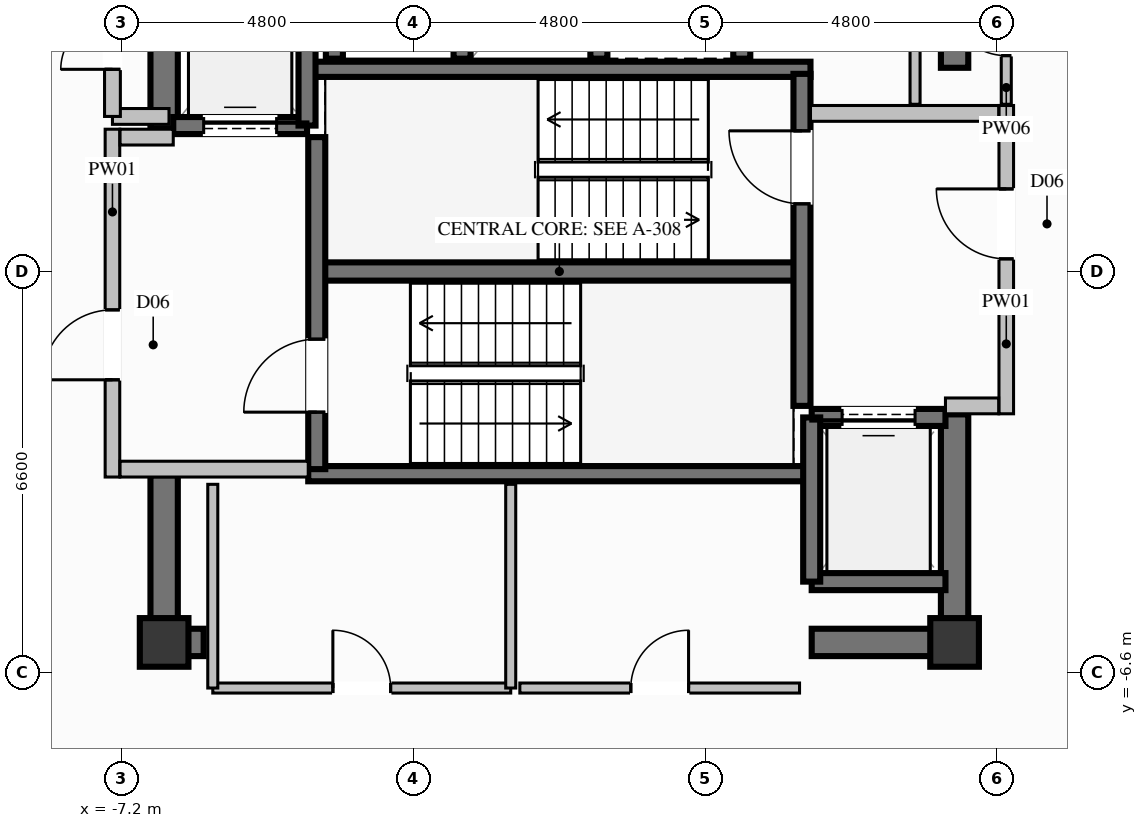
"""IFC4 building model, lengths in metres.
Left out: names, types, materials, properties, quantities, classifications, styles, units other than length and angle.
Written with IfcOpenShell. Run it as: python <this file> out.ifc"""

import sys

from ifc_helpers import new_model, si_unit, direction, frame, frame_2d, origin, origin_2d, place, context, subcontext, project, spatial, rectangle, extrude, element, fill, save


model = new_model("IFC4")
c1 = context("Model", 3, precision=1e-05, world=origin(), true_north=direction((0.0, 1.0)))
c2 = subcontext(c1, "Body", "Model", "MODEL_VIEW")
j1 = project(units=[si_unit("LENGTHUNIT", "METRE"), si_unit("PLANEANGLEUNIT", "RADIAN")], contexts=[c1])
p1 = place(None, origin())
s1 = spatial("IfcSite", under=j1, at=p1, CompositionType="ELEMENT")
p2 = place(p1, origin())
s2 = spatial("IfcBuilding", under=s1, at=p2, CompositionType="ELEMENT")
p3 = place(p2, frame((0.0, 0.0, 289.6)))
s3 = spatial("IfcBuildingStorey", under=s2, at=p3, CompositionType="ELEMENT", Elevation=289.6)
for number, where, z_axis, x_axis in (
    (1, (-6.5, -6.1, 0.0), (0.0, 0.0, 1.0), (1.0, 0.0, 0.0)),
    (2, (6.5, -6.1, 0.0), (0.0, 0.0, 1.0), (1.0, 0.0, 0.0)),
):
    element("IfcColumn", number, at=place(p3, frame(where, z_axis=z_axis, x_axis=x_axis)), inside=s3, PredefinedType="COLUMN", context=c2, shape_type="SweptSolid", body=[
        extrude(rectangle(XDim=0.8, YDim=0.8, at=origin_2d()), origin(), (0.0, 0.0, 1.0), 3.8),
    ])
p4 = place(p3, frame((-3.99, 0.0, 0.0), z_axis=(0.0, 0.0, 1.0), x_axis=(1.0, 0.0, 0.0)))
e3 = element("IfcWall", 3, at=p4, inside=s3, PredefinedType="SHEAR", context=c2, shape_type="SweptSolid", body=[
    extrude(rectangle(XDim=7.98, YDim=0.3, at=frame_2d((3.99, 0.0))), origin(), (0.0, 0.0, 1.0), 3.8),
])
for number, where, z_axis, x_axis in (
    (4, (-4.13, -3.325, 0.0), (0.0, 0.0, 1.0), (1.0, 0.0, 0.0)),
    (5, (-4.13, 3.325, 0.0), (0.0, 0.0, 1.0), (1.0, 0.0, 0.0)),
):
    element("IfcWall", number, at=place(p3, frame(where, z_axis=z_axis, x_axis=x_axis)), inside=s3, PredefinedType="SOLIDWALL", context=c2, shape_type="SweptSolid", body=[
        extrude(rectangle(XDim=8.26, YDim=0.25, at=frame_2d((4.13, 0.0))), origin(), (0.0, 0.0, 1.0), 3.8),
    ])
p5 = place(p3, frame((-6.275, -6.1, 0.0), z_axis=(0.0, 0.0, 1.0), x_axis=(1.0, 0.0, 0.0)))
e6 = element("IfcWall", 6, at=p5, inside=s3, PredefinedType="SHEAR", context=c2, shape_type="SweptSolid", body=[
    extrude(rectangle(XDim=0.425, YDim=0.45, at=frame_2d((0.212, 0.0))), origin(), (0.0, 0.0, 1.0), 3.8),
])
p6 = place(p3, frame((4.15, -6.1, 0.0), z_axis=(0.0, 0.0, 1.0), x_axis=(1.0, 0.0, 0.0)))
e7 = element("IfcWall", 7, at=p6, inside=s3, PredefinedType="SHEAR", context=c2, shape_type="SweptSolid", body=[
    extrude(rectangle(XDim=2.125, YDim=0.45, at=frame_2d((1.062, 0.0))), origin(), (0.0, 0.0, 1.0), 3.8),
])
p7 = place(p3, frame((-6.5, 2.35, 0.0), z_axis=(0.0, 0.0, 1.0), x_axis=(0.0, 1.0, 0.0)))
e8 = element("IfcWall", 8, at=p7, inside=s3, PredefinedType="SHEAR", context=c2, shape_type="SweptSolid", body=[
    extrude(rectangle(XDim=3.975, YDim=0.45, at=frame_2d((1.987, 0.0))), origin(), (0.0, 0.0, 1.0), 3.8),
])
p8 = place(p3, frame((-6.5, -6.325, 0.0), z_axis=(0.0, 0.0, 1.0), x_axis=(0.0, 1.0, 0.0)))
e9 = element("IfcWall", 9, at=p8, inside=s3, PredefinedType="SHEAR", context=c2, shape_type="SweptSolid", body=[
    extrude(rectangle(XDim=2.975, YDim=0.45, at=frame_2d((1.487, 0.0))), origin(), (0.0, 0.0, 1.0), 3.8),
])
p9 = place(p3, frame((6.5, -6.325, 0.0), z_axis=(0.0, 0.0, 1.0), x_axis=(0.0, 1.0, 0.0)))
e10 = element("IfcWall", 10, at=p9, inside=s3, PredefinedType="SHEAR", context=c2, shape_type="SweptSolid", body=[
    extrude(rectangle(XDim=3.975, YDim=0.45, at=frame_2d((1.987, 0.0))), origin(), (0.0, 0.0, 1.0), 3.8),
])
p10 = place(p3, frame((6.5, 3.35, 0.0), z_axis=(0.0, 0.0, 1.0), x_axis=(0.0, 1.0, 0.0)))
e11 = element("IfcWall", 11, at=p10, inside=s3, PredefinedType="SHEAR", context=c2, shape_type="SweptSolid", body=[
    extrude(rectangle(XDim=2.975, YDim=0.45, at=frame_2d((1.487, 0.0))), origin(), (0.0, 0.0, 1.0), 3.8),
])
for number, where, z_axis, x_axis in (
    (12, (-3.7, 6.0, 0.0), (0.0, 0.0, 1.0), (0.0, -1.0, 0.0)),
    (13, (-1.6, 3.5, 0.0), (0.0, 0.0, 1.0), (0.0, 1.0, 0.0)),
    (14, (0.65, 3.5, 0.0), (0.0, 0.0, 1.0), (0.0, 1.0, 0.0)),
    (15, (3.0, 3.5, 0.0), (0.0, 0.0, 1.0), (0.0, 1.0, 0.0)),
):
    element("IfcWall", number, at=place(p3, frame(where, z_axis=z_axis, x_axis=x_axis)), inside=s3, PredefinedType="SOLIDWALL", context=c2, shape_type="SweptSolid", body=[
        extrude(rectangle(XDim=2.5, YDim=0.28, at=frame_2d((1.25, 0.0))), origin(), (0.0, 0.0, 1.0), 3.57),
    ])
p11 = place(p3, frame((-6.35, 2.4, 0.0), z_axis=(0.0, 0.0, 1.0), x_axis=(1.0, 0.0, 0.0)))
e16 = element("IfcWall", 16, at=p11, inside=s3, PredefinedType="SOLIDWALL", context=c2, shape_type="SweptSolid", body=[
    extrude(rectangle(XDim=2.2, YDim=0.28, at=frame_2d((1.1, 0.0))), origin(), (0.0, 0.0, 1.0), 3.57),
])
p12 = place(p11, frame((0.5, 0.0, 0.0)))
e17 = element("IfcOpeningElement", 17, at=p12, cuts=e16, PredefinedType="OPENING", context=c2, shape_type="SweptSolid", body=[
    extrude(rectangle(XDim=1.2, YDim=2.2, at=frame_2d((0.6, 1.1))), frame((0.0, 0.15, 0.0), z_axis=(0.0, -1.0, 0.0), x_axis=(1.0, 0.0, 0.0)), (0.0, 0.0, 1.0), 0.3),
])
p13 = place(p3, frame((-4.15, 2.4, 0.0), z_axis=(0.0, 0.0, 1.0), x_axis=(0.0, 1.0, 0.0)))
e18 = element("IfcWall", 18, at=p13, inside=s3, PredefinedType="SOLIDWALL", context=c2, shape_type="SweptSolid", body=[
    extrude(rectangle(XDim=2.7, YDim=0.28, at=frame_2d((1.35, 0.0))), origin(), (0.0, 0.0, 1.0), 3.57),
])
p14 = place(p3, frame((4.15, -5.1, 0.0), z_axis=(0.0, 0.0, 1.0), x_axis=(1.0, 0.0, 0.0)))
e19 = element("IfcWall", 19, at=p14, inside=s3, PredefinedType="SOLIDWALL", context=c2, shape_type="SweptSolid", body=[
    extrude(rectangle(XDim=2.2, YDim=0.28, at=frame_2d((1.1, 0.0))), origin(), (0.0, 0.0, 1.0), 3.57),
])
p15 = place(p3, frame((6.35, -2.4, 0.0), z_axis=(0.0, 0.0, 1.0), x_axis=(-1.0, 0.0, 0.0)))
e20 = element("IfcWall", 20, at=p15, inside=s3, PredefinedType="SOLIDWALL", context=c2, shape_type="SweptSolid", body=[
    extrude(rectangle(XDim=2.2, YDim=0.28, at=frame_2d((1.1, 0.0))), origin(), (0.0, 0.0, 1.0), 3.57),
])
p16 = place(p15, frame((0.5, 0.0, 0.0)))
e21 = element("IfcOpeningElement", 21, at=p16, cuts=e20, PredefinedType="OPENING", context=c2, shape_type="SweptSolid", body=[
    extrude(rectangle(XDim=1.2, YDim=2.2, at=frame_2d((0.6, 1.1))), frame((0.0, 0.15, 0.0), z_axis=(0.0, -1.0, 0.0), x_axis=(1.0, 0.0, 0.0)), (0.0, 0.0, 1.0), 0.3),
])
p17 = place(p3, frame((4.15, -2.4, 0.0), z_axis=(0.0, 0.0, 1.0), x_axis=(0.0, -1.0, 0.0)))
e22 = element("IfcWall", 22, at=p17, inside=s3, PredefinedType="SOLIDWALL", context=c2, shape_type="SweptSolid", body=[
    extrude(rectangle(XDim=2.7, YDim=0.28, at=frame_2d((1.35, 0.0))), origin(), (0.0, 0.0, 1.0), 3.57),
])
p18 = place(p3, frame((-3.99, -3.25, 0.0), z_axis=(0.0, 0.0, 1.0), x_axis=(0.0, 1.0, 0.0)))
e23 = element("IfcWall", 23, at=p18, inside=s3, PredefinedType="SOLIDWALL", context=c2, shape_type="SweptSolid", body=[
    extrude(rectangle(XDim=5.46, YDim=0.28, at=frame_2d((2.73, 0.0))), origin(), (0.0, 0.0, 1.0), 3.57),
])
p19 = place(p18, frame((0.937, 0.0, 0.0)))
e24 = element("IfcOpeningElement", 24, at=p19, cuts=e23, PredefinedType="OPENING", context=c2, shape_type="SweptSolid", body=[
    extrude(rectangle(XDim=1.2, YDim=2.2, at=frame_2d((0.6, 1.1))), frame((0.0, 0.15, 0.0), z_axis=(0.0, -1.0, 0.0), x_axis=(1.0, 0.0, 0.0)), (0.0, 0.0, 1.0), 0.3),
])
p20 = place(p3, frame((3.99, -2.21, 0.0), z_axis=(0.0, 0.0, 1.0), x_axis=(0.0, 1.0, 0.0)))
e25 = element("IfcWall", 25, at=p20, inside=s3, PredefinedType="SOLIDWALL", context=c2, shape_type="SweptSolid", body=[
    extrude(rectangle(XDim=5.46, YDim=0.28, at=frame_2d((2.73, 0.0))), origin(), (0.0, 0.0, 1.0), 3.57),
])
p21 = place(p20, frame((3.323, 0.0, 0.0)))
e26 = element("IfcOpeningElement", 26, at=p21, cuts=e25, PredefinedType="OPENING", context=c2, shape_type="SweptSolid", body=[
    extrude(rectangle(XDim=1.2, YDim=2.2, at=frame_2d((0.6, 1.1))), frame((0.0, 0.15, 0.0), z_axis=(0.0, -1.0, 0.0), x_axis=(1.0, 0.0, 0.0)), (0.0, 0.0, 1.0), 0.3),
])
p22 = place(p3, frame((-7.35, -3.38, 0.0), z_axis=(0.0, 0.0, 1.0), x_axis=(0.0, 1.0, 0.0)))
e27 = element("IfcWall", 27, at=p22, inside=s3, PredefinedType="PARTITIONING", context=c2, shape_type="SweptSolid", body=[
    extrude(rectangle(XDim=5.72, YDim=0.24, at=frame_2d((2.86, 0.0))), origin(), (0.0, 0.0, 1.0), 2.655),
])
p23 = place(p22, frame((1.599, 0.0, 0.0)))
e28 = element("IfcOpeningElement", 28, at=p23, cuts=e27, PredefinedType="OPENING", context=c2, shape_type="SweptSolid", body=[
    extrude(rectangle(XDim=1.15, YDim=2.2, at=frame_2d((0.575, 1.1))), frame((0.0, 0.13, 0.0), z_axis=(0.0, -1.0, 0.0), x_axis=(1.0, 0.0, 0.0)), (0.0, 0.0, 1.0), 0.26),
])
p24 = place(p3, frame((-7.225, -3.25, 0.0), z_axis=(0.0, 0.0, 1.0), x_axis=(1.0, 0.0, 0.0)))
e29 = element("IfcWall", 29, at=p24, inside=s3, PredefinedType="PARTITIONING", context=c2, shape_type="SweptSolid", body=[
    extrude(rectangle(XDim=3.095, YDim=0.26, at=frame_2d((1.548, 0.0))), origin(), (0.0, 0.0, 1.0), 3.57),
])
p25 = place(p3, frame((-7.225, 2.21, 0.0), z_axis=(0.0, 0.0, 1.0), x_axis=(1.0, 0.0, 0.0)))
e30 = element("IfcWall", 30, at=p25, inside=s3, PredefinedType="PARTITIONING", context=c2, shape_type="SweptSolid", body=[
    extrude(rectangle(XDim=0.875, YDim=0.26, at=frame_2d((0.438, 0.0))), origin(), (0.0, 0.0, 1.0), 3.57),
])
p26 = place(p3, frame((7.35, -2.34, 0.0), z_axis=(0.0, 0.0, 1.0), x_axis=(0.0, 1.0, 0.0)))
e31 = element("IfcWall", 31, at=p26, inside=s3, PredefinedType="PARTITIONING", context=c2, shape_type="SweptSolid", body=[
    extrude(rectangle(XDim=5.07, YDim=0.24, at=frame_2d((2.535, 0.0))), origin(), (0.0, 0.0, 1.0), 2.655),
])
p27 = place(p26, frame((2.548, 0.0, 0.0)))
e32 = element("IfcOpeningElement", 32, at=p27, cuts=e31, PredefinedType="OPENING", context=c2, shape_type="SweptSolid", body=[
    extrude(rectangle(XDim=1.15, YDim=2.2, at=frame_2d((0.575, 1.1))), frame((0.0, 0.13, 0.0), z_axis=(0.0, -1.0, 0.0), x_axis=(1.0, 0.0, 0.0)), (0.0, 0.0, 1.0), 0.26),
])
p28 = place(p3, frame((6.35, -2.21, 0.0), z_axis=(0.0, 0.0, 1.0), x_axis=(1.0, 0.0, 0.0)))
e33 = element("IfcWall", 33, at=p28, inside=s3, PredefinedType="PARTITIONING", context=c2, shape_type="SweptSolid", body=[
    extrude(rectangle(XDim=0.875, YDim=0.26, at=frame_2d((0.438, 0.0))), origin(), (0.0, 0.0, 1.0), 3.57),
])
p29 = place(p3, frame((4.13, 2.6, 0.0), z_axis=(0.0, 0.0, 1.0), x_axis=(1.0, 0.0, 0.0)))
e34 = element("IfcWall", 34, at=p29, inside=s3, PredefinedType="PARTITIONING", context=c2, shape_type="SweptSolid", body=[
    extrude(rectangle(XDim=3.095, YDim=0.26, at=frame_2d((1.548, 0.0))), origin(), (0.0, 0.0, 1.0), 3.57),
])
p30 = place(p3, frame((-7.35, 2.55, 0.0), z_axis=(0.0, 0.0, 1.0), x_axis=(1.0, 0.0, 0.0)))
e35 = element("IfcWall", 35, at=p30, inside=s3, PredefinedType="PARTITIONING", context=c2, shape_type="SweptSolid", body=[
    extrude(rectangle(XDim=0.93, YDim=0.26, at=frame_2d((0.465, 0.0))), origin(), (0.0, 0.0, 1.0), 3.57),
])
p31 = place(p3, frame((-7.35, 2.55, 0.0), z_axis=(0.0, 0.0, 1.0), x_axis=(0.0, 1.0, 0.0)))
e36 = element("IfcWall", 36, at=p31, inside=s3, PredefinedType="PARTITIONING", context=c2, shape_type="SweptSolid", body=[
    extrude(rectangle(XDim=2.4, YDim=0.26, at=frame_2d((1.2, 0.0))), origin(), (0.0, 0.0, 1.0), 2.655),
])
p32 = place(p31, frame((0.775, 0.0, 0.0)))
e37 = element("IfcOpeningElement", 37, at=p32, cuts=e36, PredefinedType="OPENING", context=c2, shape_type="SweptSolid", body=[
    extrude(rectangle(XDim=0.85, YDim=2.05, at=frame_2d((0.425, 1.025))), frame((0.0, 0.14, 0.0), z_axis=(0.0, -1.0, 0.0), x_axis=(1.0, 0.0, 0.0)), (0.0, 0.0, 1.0), 0.28),
])
p33 = place(p3, frame((7.35, 2.75, 0.0), z_axis=(0.0, 0.0, 1.0), x_axis=(0.0, 1.0, 0.0)))
e38 = element("IfcWall", 38, at=p33, inside=s3, PredefinedType="PARTITIONING", context=c2, shape_type="SweptSolid", body=[
    extrude(rectangle(XDim=2.55, YDim=0.165, at=frame_2d((1.275, 0.0))), origin(), (0.0, 0.0, 1.0), 3.57),
])
p34 = place(p33, frame((0.8, 0.0, 0.0)))
e39 = element("IfcOpeningElement", 39, at=p34, cuts=e38, PredefinedType="OPENING", context=c2, shape_type="SweptSolid", body=[
    extrude(rectangle(XDim=0.95, YDim=2.1, at=frame_2d((0.475, 1.05))), frame((0.0, 0.093, 0.0), z_axis=(0.0, -1.0, 0.0), x_axis=(1.0, 0.0, 0.0)), (0.0, 0.0, 1.0), 0.185),
])
p35 = place(p3, frame((5.85, 5.3, 0.0), z_axis=(0.0, 0.0, 1.0), x_axis=(0.0, -1.0, 0.0)))
e40 = element("IfcWall", 40, at=p35, inside=s3, PredefinedType="PARTITIONING", context=c2, shape_type="SweptSolid", body=[
    extrude(rectangle(XDim=2.55, YDim=0.165, at=frame_2d((1.275, 0.0))), origin(), (0.0, 0.0, 1.0), 2.655),
])
p36 = place(p3, frame((-5.7, -6.85, 0.0), z_axis=(0.0, 0.0, 1.0), x_axis=(1.0, 0.0, 0.0)))
e41 = element("IfcWall", 41, at=p36, inside=s3, PredefinedType="PARTITIONING", context=c2, shape_type="SweptSolid", body=[
    extrude(rectangle(XDim=4.9, YDim=0.165, at=frame_2d((2.45, 0.0))), origin(), (0.0, 0.0, 1.0), 2.655),
])
p37 = place(p36, frame((1.975, 0.0, 0.0)))
e42 = element("IfcOpeningElement", 42, at=p37, cuts=e41, PredefinedType="OPENING", context=c2, shape_type="SweptSolid", body=[
    extrude(rectangle(XDim=0.95, YDim=2.1, at=frame_2d((0.475, 1.05))), frame((0.0, 0.093, 0.0), z_axis=(0.0, -1.0, 0.0), x_axis=(1.0, 0.0, 0.0)), (0.0, 0.0, 1.0), 0.185),
])
p38 = place(p3, frame((-0.8, -6.85, 0.0), z_axis=(0.0, 0.0, 1.0), x_axis=(0.0, 1.0, 0.0)))
e43 = element("IfcWall", 43, at=p38, inside=s3, PredefinedType="PARTITIONING", context=c2, shape_type="SweptSolid", body=[
    extrude(rectangle(XDim=3.35, YDim=0.165, at=frame_2d((1.675, 0.0))), origin(), (0.0, 0.0, 1.0), 3.57),
])
p39 = place(p3, frame((-5.7, -3.5, 0.0), z_axis=(0.0, 0.0, 1.0), x_axis=(0.0, -1.0, 0.0)))
e44 = element("IfcWall", 44, at=p39, inside=s3, PredefinedType="PARTITIONING", context=c2, shape_type="SweptSolid", body=[
    extrude(rectangle(XDim=3.35, YDim=0.165, at=frame_2d((1.675, 0.0))), origin(), (0.0, 0.0, 1.0), 2.655),
])
p40 = place(p3, frame((-0.65, -6.85, 0.0), z_axis=(0.0, 0.0, 1.0), x_axis=(1.0, 0.0, 0.0)))
e45 = element("IfcWall", 45, at=p40, inside=s3, PredefinedType="PARTITIONING", context=c2, shape_type="SweptSolid", body=[
    extrude(rectangle(XDim=4.6, YDim=0.165, at=frame_2d((2.3, 0.0))), origin(), (0.0, 0.0, 1.0), 2.655),
])
p41 = place(p40, frame((1.825, 0.0, 0.0)))
e46 = element("IfcOpeningElement", 46, at=p41, cuts=e45, PredefinedType="OPENING", context=c2, shape_type="SweptSolid", body=[
    extrude(rectangle(XDim=0.95, YDim=2.1, at=frame_2d((0.475, 1.05))), frame((0.0, 0.093, 0.0), z_axis=(0.0, -1.0, 0.0), x_axis=(1.0, 0.0, 0.0)), (0.0, 0.0, 1.0), 0.185),
])
p42 = place(p12, origin())
e47 = element("IfcDoor", 47, at=p42, inside=s3, OperationType="SLIDING_TO_LEFT", PredefinedType="DOOR", context=c2, shape_type="SweptSolid", body=[
    extrude(rectangle(XDim=1.2, YDim=2.2, at=frame_2d((0.6, 1.1))), frame((0.0, 0.025, 0.0), z_axis=(0.0, -1.0, 0.0), x_axis=(1.0, 0.0, 0.0)), (0.0, 0.0, 1.0), 0.05),
])
fill(e17, e47)
p43 = place(p16, origin())
e48 = element("IfcDoor", 48, at=p43, inside=s3, OperationType="SLIDING_TO_LEFT", PredefinedType="DOOR", context=c2, shape_type="SweptSolid", body=[
    extrude(rectangle(XDim=1.2, YDim=2.2, at=frame_2d((0.6, 1.1))), frame((0.0, 0.025, 0.0), z_axis=(0.0, -1.0, 0.0), x_axis=(1.0, 0.0, 0.0)), (0.0, 0.0, 1.0), 0.05),
])
fill(e21, e48)
p44 = place(p19, origin())
e49 = element("IfcDoor", 49, at=p44, inside=s3, OperationType="SINGLE_SWING_LEFT", PredefinedType="DOOR", context=c2, shape_type="SweptSolid", body=[
    extrude(rectangle(XDim=1.2, YDim=2.2, at=frame_2d((0.6, 1.1))), frame((0.0, 0.025, 0.0), z_axis=(0.0, -1.0, 0.0), x_axis=(1.0, 0.0, 0.0)), (0.0, 0.0, 1.0), 0.05),
])
fill(e24, e49)
p45 = place(p21, origin())
e50 = element("IfcDoor", 50, at=p45, inside=s3, OperationType="SINGLE_SWING_RIGHT", PredefinedType="DOOR", context=c2, shape_type="SweptSolid", body=[
    extrude(rectangle(XDim=1.2, YDim=2.2, at=frame_2d((0.6, 1.1))), frame((0.0, 0.025, 0.0), z_axis=(0.0, -1.0, 0.0), x_axis=(1.0, 0.0, 0.0)), (0.0, 0.0, 1.0), 0.05),
])
fill(e26, e50)
p46 = place(p23, origin())
e51 = element("IfcDoor", 51, at=p46, inside=s3, OperationType="SINGLE_SWING_LEFT", PredefinedType="DOOR", context=c2, shape_type="SweptSolid", body=[
    extrude(rectangle(XDim=1.15, YDim=2.2, at=frame_2d((0.575, 1.1))), frame((0.0, 0.025, 0.0), z_axis=(0.0, -1.0, 0.0), x_axis=(1.0, 0.0, 0.0)), (0.0, 0.0, 1.0), 0.05),
])
fill(e28, e51)
p47 = place(p27, origin())
e52 = element("IfcDoor", 52, at=p47, inside=s3, OperationType="SINGLE_SWING_RIGHT", PredefinedType="DOOR", context=c2, shape_type="SweptSolid", body=[
    extrude(rectangle(XDim=1.15, YDim=2.2, at=frame_2d((0.575, 1.1))), frame((0.0, 0.025, 0.0), z_axis=(0.0, -1.0, 0.0), x_axis=(1.0, 0.0, 0.0)), (0.0, 0.0, 1.0), 0.05),
])
fill(e32, e52)
p48 = place(p32, origin())
e53 = element("IfcDoor", 53, at=p48, inside=s3, OperationType="SINGLE_SWING_LEFT", PredefinedType="DOOR", context=c2, shape_type="SweptSolid", body=[
    extrude(rectangle(XDim=0.85, YDim=2.05, at=frame_2d((0.425, 1.025))), frame((0.0, 0.025, 0.0), z_axis=(0.0, -1.0, 0.0), x_axis=(1.0, 0.0, 0.0)), (0.0, 0.0, 1.0), 0.05),
])
fill(e37, e53)
p49 = place(p34, origin())
e54 = element("IfcDoor", 54, at=p49, inside=s3, OperationType="SINGLE_SWING_RIGHT", PredefinedType="DOOR", context=c2, shape_type="SweptSolid", body=[
    extrude(rectangle(XDim=0.95, YDim=2.1, at=frame_2d((0.475, 1.05))), frame((0.0, 0.025, 0.0), z_axis=(0.0, -1.0, 0.0), x_axis=(1.0, 0.0, 0.0)), (0.0, 0.0, 1.0), 0.05),
])
fill(e39, e54)
p50 = place(p37, origin())
e55 = element("IfcDoor", 55, at=p50, inside=s3, OperationType="SINGLE_SWING_LEFT", PredefinedType="DOOR", context=c2, shape_type="SweptSolid", body=[
    extrude(rectangle(XDim=0.95, YDim=2.1, at=frame_2d((0.475, 1.05))), frame((0.0, 0.025, 0.0), z_axis=(0.0, -1.0, 0.0), x_axis=(1.0, 0.0, 0.0)), (0.0, 0.0, 1.0), 0.05),
])
fill(e42, e55)
p51 = place(p41, origin())
e56 = element("IfcDoor", 56, at=p51, inside=s3, OperationType="SINGLE_SWING_RIGHT", PredefinedType="DOOR", context=c2, shape_type="SweptSolid", body=[
    extrude(rectangle(XDim=0.95, YDim=2.1, at=frame_2d((0.475, 1.05))), frame((0.0, 0.025, 0.0), z_axis=(0.0, -1.0, 0.0), x_axis=(1.0, 0.0, 0.0)), (0.0, 0.0, 1.0), 0.05),
])
fill(e46, e56)
save(model, sys.argv[1])
